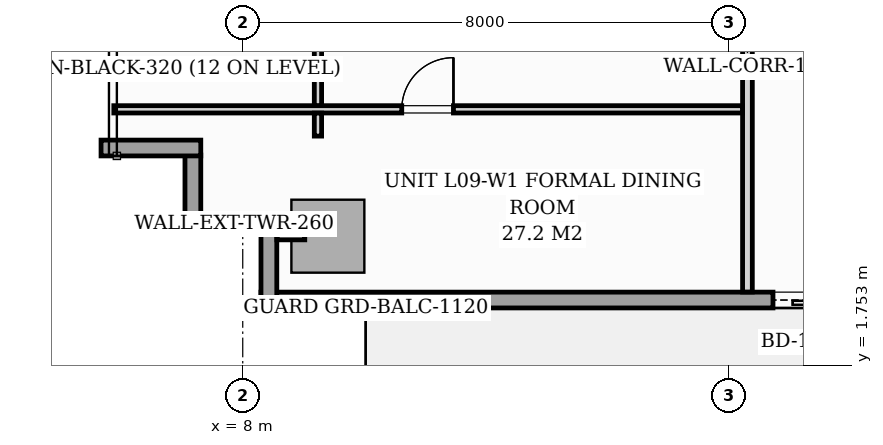
"""IFC4 building model, lengths in metres.
Left out: names, types, materials, properties, quantities, classifications, styles, units other than length and angle.
Written with IfcOpenShell. Run it as: python <this file> out.ifc"""

import sys

from ifc_helpers import new_model, si_unit, direction, frame, frame_2d, origin, origin_2d, place, context, subcontext, project, spatial, rectangle, extrude, source, transform, mapped, element, fill, save


model = new_model("IFC4")
c1 = context("Model", 3, precision=1e-05, world=origin(), true_north=direction((0.0, 1.0)))
c2 = subcontext(c1, "Body", "Model", "MODEL_VIEW")
j1 = project(units=[si_unit("LENGTHUNIT", "METRE"), si_unit("PLANEANGLEUNIT", "RADIAN")], contexts=[c1])
p1 = place(None, origin())
s1 = spatial("IfcSite", under=j1, at=p1, CompositionType="ELEMENT")
p2 = place(p1, origin())
s2 = spatial("IfcBuilding", under=s1, at=p2, CompositionType="ELEMENT")
p3 = place(p2, frame((0.0, 0.0, 35.8)))
s3 = spatial("IfcBuildingStorey", under=s2, at=p3, CompositionType="ELEMENT", Elevation=35.8)
m1 = source(origin(), c2, "Body", "SweptSolid", [
    extrude(rectangle(XDim=1.2, YDim=1.2, at=origin_2d()), origin(), (0.0, 0.0, 1.0), 3.196),
])
p4 = place(p3, frame((9.4, 3.88, 0.002), z_axis=(0.0, 0.0, 1.0), x_axis=(1.0, 0.0, 0.0)))
e1 = element("IfcColumn", 1, at=p4, inside=s3, PredefinedType="COLUMN", context=c2, shape_type="MappedRepresentation", body=[
    mapped(m1, transform((0.0, 0.0, 0.0), scale=1.0)),
])
p5 = place(p3, frame((8.798, 4.08, 0.0), z_axis=(0.0, 0.0, 1.0), x_axis=(-1.0, 0.0, 0.0)))
e2 = element("IfcWall", 2, at=p5, inside=s3, PredefinedType="STANDARD", context=c2, shape_type="SweptSolid", body=[
    extrude(rectangle(XDim=1.878, YDim=0.26, at=frame_2d((0.939, 0.0))), origin(), (0.0, 0.0, 1.0), 2.94),
])
p6 = place(p3, frame((7.18, 4.065, 0.0), z_axis=(0.0, 0.0, 1.0), x_axis=(0.0, 1.0, 0.0)))
e3 = element("IfcWall", 3, at=p6, inside=s3, PredefinedType="STANDARD", context=c2, shape_type="SweptSolid", body=[
    extrude(rectangle(XDim=1.15, YDim=0.26, at=frame_2d((0.575, 0.0))), origin(), (0.0, 0.0, 1.0), 2.94),
])
p7 = place(p3, frame((7.31, 5.33, 0.0), z_axis=(0.0, 0.0, 1.0), x_axis=(-1.0, 0.0, 0.0)))
e4 = element("IfcWall", 4, at=p7, inside=s3, PredefinedType="STANDARD", context=c2, shape_type="SweptSolid", body=[
    extrude(rectangle(XDim=1.64, YDim=0.26, at=frame_2d((0.82, 0.0))), origin(), (0.0, 0.0, 1.0), 2.94),
])
p8 = place(p3, frame((25.45, 2.83, 0.0), z_axis=(0.0, 0.0, 1.0), x_axis=(-1.0, 0.0, 0.0)))
e5 = element("IfcWall", 5, at=p8, inside=s3, PredefinedType="STANDARD", context=c2, shape_type="SweptSolid", body=[
    extrude(rectangle(XDim=17.15, YDim=0.26, at=frame_2d((8.575, 0.0))), origin(), (0.0, 0.0, 1.0), 2.94),
])
p9 = place(p8, frame((6.93, 0.0, 0.0)))
e6 = element("IfcOpeningElement", 6, at=p9, cuts=e5, PredefinedType="OPENING", context=c2, shape_type="SweptSolid", body=[
    extrude(rectangle(XDim=1.8, YDim=2.06, at=frame_2d((0.9, 1.03))), frame((0.0, 0.14, 0.0), z_axis=(0.0, -1.0, 0.0), x_axis=(1.0, 0.0, 0.0)), (0.0, 0.0, 1.0), 0.28),
])
p10 = place(p8, frame((0.7, 0.0, 0.65)))
e7 = element("IfcOpeningElement", 7, at=p10, cuts=e5, PredefinedType="OPENING", context=c2, shape_type="SweptSolid", body=[
    extrude(rectangle(XDim=1.6, YDim=1.5, at=frame_2d((0.8, 0.75))), frame((0.0, 0.14, 0.0), z_axis=(0.0, -1.0, 0.0), x_axis=(1.0, 0.0, 0.0)), (0.0, 0.0, 1.0), 0.28),
])
p11 = place(p3, frame((8.43, 2.815, 0.0), z_axis=(0.0, 0.0, 1.0), x_axis=(0.0, 1.0, 0.0)))
e8 = element("IfcWall", 8, at=p11, inside=s3, PredefinedType="STANDARD", context=c2, shape_type="SweptSolid", body=[
    extrude(rectangle(XDim=1.395, YDim=0.26, at=frame_2d((0.698, 0.0))), origin(), (0.0, 0.0, 1.0), 2.94),
])
p12 = place(p3, frame((16.3, 2.962, 0.0), z_axis=(0.0, 0.0, 1.0), x_axis=(0.0, 1.0, 0.0)))
e9 = element("IfcWall", 9, at=p12, inside=s3, PredefinedType="PARTITIONING", context=c2, shape_type="SweptSolid", body=[
    extrude(rectangle(XDim=9.446, YDim=0.16, at=frame_2d((4.723, 0.0))), origin(), (0.0, 0.0, 1.0), 2.94),
])
p13 = place(p3, frame((5.88, 5.966, 0.0), z_axis=(0.0, 0.0, 1.0), x_axis=(1.0, 0.0, 0.0)))
e10 = element("IfcWall", 10, at=p13, inside=s3, PredefinedType="PARTITIONING", context=c2, shape_type="SweptSolid", body=[
    extrude(rectangle(XDim=10.338, YDim=0.12, at=frame_2d((5.169, 0.0))), origin(), (0.0, 0.0, 1.0), 2.94),
])
p14 = place(p13, frame((4.735, 0.0, 0.0)))
e11 = element("IfcOpeningElement", 11, at=p14, cuts=e10, PredefinedType="OPENING", context=c2, shape_type="SweptSolid", body=[
    extrude(rectangle(XDim=0.85, YDim=2.05, at=frame_2d((0.425, 1.025))), frame((0.0, 0.07, 0.0), z_axis=(0.0, -1.0, 0.0), x_axis=(1.0, 0.0, 0.0)), (0.0, 0.0, 1.0), 0.14),
])
p15 = place(p3, frame((9.237, 5.526, 0.0), z_axis=(0.0, 0.0, 1.0), x_axis=(0.0, 1.0, 0.0)))
e12 = element("IfcWall", 12, at=p15, inside=s3, PredefinedType="PARTITIONING", context=c2, shape_type="SweptSolid", body=[
    extrude(rectangle(XDim=0.378, YDim=0.12, at=frame_2d((0.189, 0.0))), origin(), (0.0, 0.0, 1.0), 2.94),
])
p16 = place(p3, frame((9.237, 6.028, 0.0), z_axis=(0.0, 0.0, 1.0), x_axis=(0.0, 1.0, 0.0)))
e13 = element("IfcWall", 13, at=p16, inside=s3, PredefinedType="PARTITIONING", context=c2, shape_type="SweptSolid", body=[
    extrude(rectangle(XDim=9.632, YDim=0.12, at=frame_2d((4.816, 0.0))), origin(), (0.0, 0.0, 1.0), 2.94),
])
p17 = place(p16, frame((4.391, 0.0, 0.0)))
e14 = element("IfcOpeningElement", 14, at=p17, cuts=e13, PredefinedType="OPENING", context=c2, shape_type="SweptSolid", body=[
    extrude(rectangle(XDim=0.85, YDim=2.05, at=frame_2d((0.425, 1.025))), frame((0.0, 0.07, 0.0), z_axis=(0.0, -1.0, 0.0), x_axis=(1.0, 0.0, 0.0)), (0.0, 0.0, 1.0), 0.14),
])
p18 = place(p3, frame((9.02, 3.88, 0.0), z_axis=(0.0, 0.0, 1.0), x_axis=(-1.0, 0.0, 0.0)))
e15 = element("IfcWall", 15, at=p18, inside=s3, PredefinedType="PARTITIONING", context=c2, shape_type="SweptSolid", body=[
    extrude(rectangle(XDim=0.458, YDim=0.12, at=frame_2d((0.229, 0.0))), origin(), (0.0, 0.0, 1.0), 2.94),
])
m2 = source(origin(), c2, "Body", "SweptSolid", [
    extrude(rectangle(XDim=1.8, YDim=2.06, at=frame_2d((0.9, 1.03))), frame((0.0, 0.025, 0.0), z_axis=(0.0, -1.0, 0.0), x_axis=(1.0, 0.0, 0.0)), (0.0, 0.0, 1.0), 0.05),
])
p19 = place(p9, origin())
e16 = element("IfcDoor", 16, at=p19, inside=s3, OperationType="SLIDING_TO_LEFT", PredefinedType="DOOR", context=c2, shape_type="MappedRepresentation", body=[
    mapped(m2, transform((0.0, 0.0, 0.0), scale=1.0)),
])
fill(e6, e16)
m3 = source(origin(), c2, "Body", "SweptSolid", [
    extrude(rectangle(XDim=0.85, YDim=2.05, at=frame_2d((0.425, 1.025))), frame((0.0, 0.025, 0.0), z_axis=(0.0, -1.0, 0.0), x_axis=(1.0, 0.0, 0.0)), (0.0, 0.0, 1.0), 0.05),
])
p20 = place(p14, origin())
e17 = element("IfcDoor", 17, at=p20, inside=s3, OperationType="SINGLE_SWING_RIGHT", PredefinedType="DOOR", context=c2, shape_type="MappedRepresentation", body=[
    mapped(m3, transform((0.0, 0.0, 0.0), scale=1.0)),
])
fill(e11, e17)
save(model, sys.argv[1])
